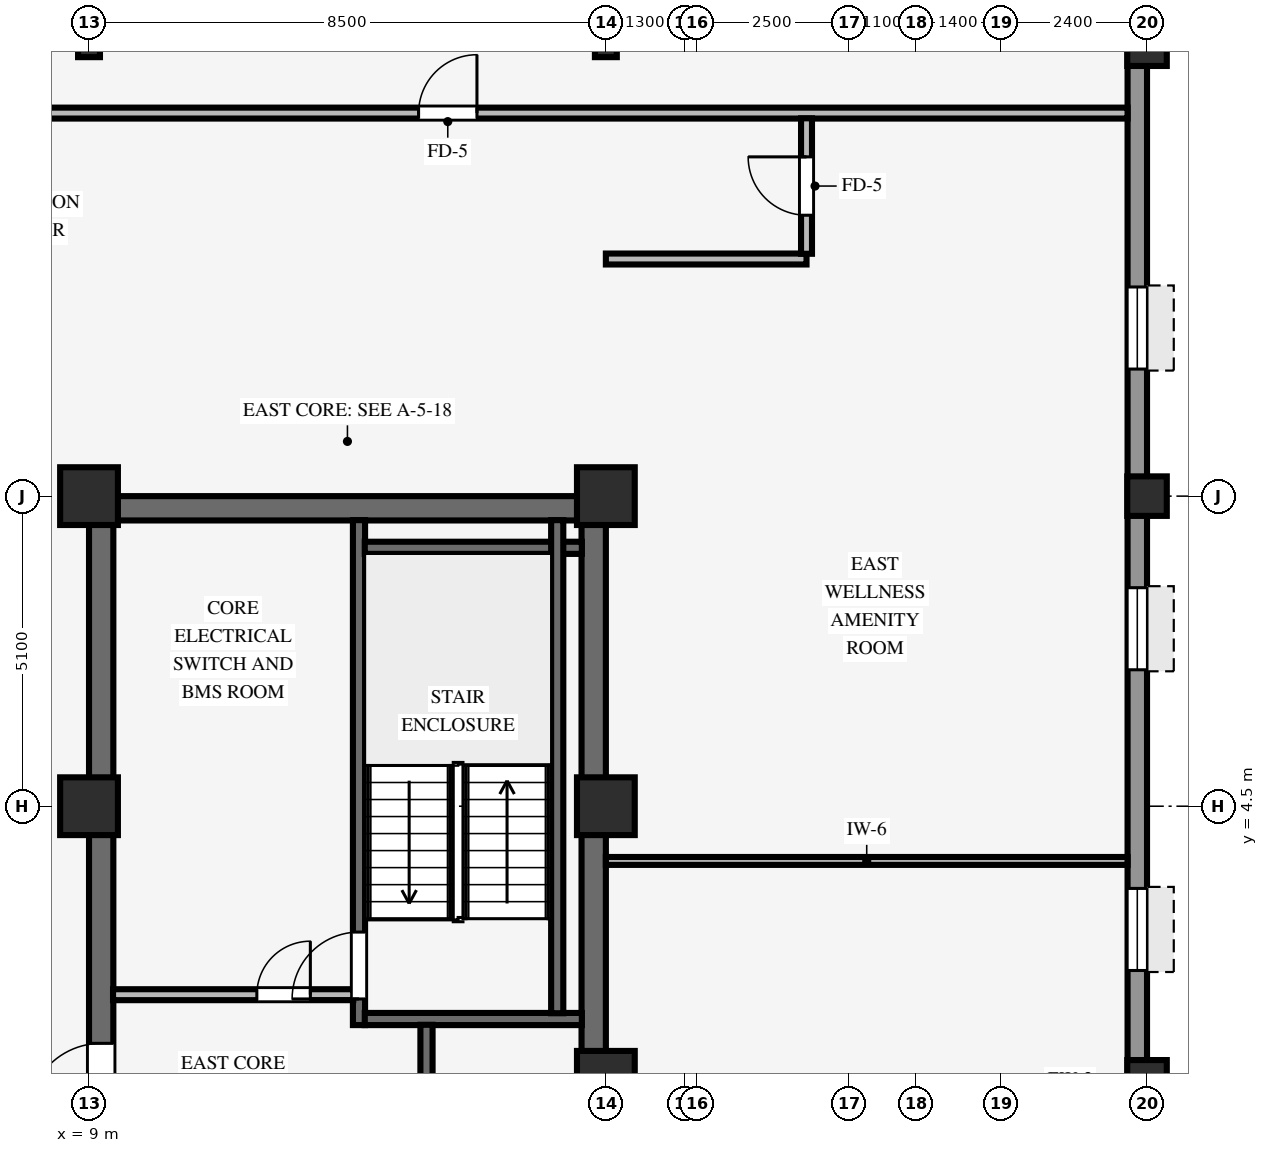
"""IFC4 building model, lengths in metres.
Left out: names, types, materials, properties, quantities, classifications, styles, units other than length and angle.
Written with IfcOpenShell. Run it as: python <this file> out.ifc"""

import sys

from ifc_helpers import new_model, si_unit, direction, frame, frame_2d, origin, origin_2d, place, context, subcontext, project, spatial, rectangle, hollow_rectangle, i_section, extrude, source, transform, mapped, element, fill, save


model = new_model("IFC4")
c1 = context("Model", 3, precision=1e-05, world=origin(), true_north=direction((0.0, 1.0)))
c2 = subcontext(c1, "Body", "Model", "MODEL_VIEW")
j1 = project(units=[si_unit("LENGTHUNIT", "METRE"), si_unit("PLANEANGLEUNIT", "RADIAN")], contexts=[c1])
p1 = place(None, origin())
s1 = spatial("IfcSite", under=j1, at=p1, CompositionType="ELEMENT")
p2 = place(p1, origin())
s2 = spatial("IfcBuilding", under=s1, at=p2, CompositionType="ELEMENT")
p3 = place(p2, frame((0.0, 0.0, 160.35)))
s3 = spatial("IfcBuildingStorey", under=s2, at=p3, CompositionType="ELEMENT", Elevation=160.35)
p4 = place(p3, frame((9.0, 9.4, 0.0), z_axis=(0.0, 0.0, 1.0), x_axis=(1.0, 0.0, 0.0)))
e1 = element("IfcWall", 1, at=p4, inside=s3, PredefinedType="SHEAR", context=c2, shape_type="SweptSolid", body=[
    extrude(rectangle(XDim=8.5, YDim=0.4, at=frame_2d((4.25, 0.0))), origin(), (0.0, 0.0, 1.0), 3.37),
])
p5 = place(p3, frame((9.2, -9.205, 0.0), z_axis=(0.0, 0.0, 1.0), x_axis=(0.0, 1.0, 0.0)))
e2 = element("IfcWall", 2, at=p5, inside=s3, PredefinedType="SHEAR", context=c2, shape_type="SweptSolid", body=[
    extrude(rectangle(XDim=18.41, YDim=0.4, at=frame_2d((9.205, 0.0))), origin(), (0.0, 0.0, 1.0), 3.37),
])
p6 = place(p5, frame((8.605, 0.0, 0.0)))
e3 = element("IfcOpeningElement", 3, at=p6, cuts=e2, PredefinedType="OPENING", context=c2, shape_type="SweptSolid", body=[
    extrude(rectangle(XDim=1.2, YDim=2.15, at=frame_2d((0.6, 1.075))), frame((0.0, 0.21, 0.0), z_axis=(0.0, -1.0, 0.0), x_axis=(1.0, 0.0, 0.0)), (0.0, 0.0, 1.0), 0.42),
])
p7 = place(p3, frame((17.3, -9.205, 0.0), z_axis=(0.0, 0.0, 1.0), x_axis=(0.0, 1.0, 0.0)))
e4 = element("IfcWall", 4, at=p7, inside=s3, PredefinedType="SHEAR", context=c2, shape_type="SweptSolid", body=[
    extrude(rectangle(XDim=18.41, YDim=0.4, at=frame_2d((9.205, 0.0))), origin(), (0.0, 0.0, 1.0), 3.37),
])
for number, where, z_axis, x_axis in (
    (5, (9.0, 4.5, 0.0), (0.0, 0.0, 1.0), (1.0, 0.0, 0.0)),
    (6, (9.0, 9.6, 0.0), (0.0, 0.0, 1.0), (1.0, 0.0, 0.0)),
    (7, (17.5, 4.5, 0.0), (0.0, 0.0, 1.0), (1.0, 0.0, 0.0)),
    (8, (17.5, 9.6, 0.0), (0.0, 0.0, 1.0), (1.0, 0.0, 0.0)),
    (9, (17.5, 0.0, 0.0), (0.0, 0.0, 1.0), (1.0, 0.0, 0.0)),
):
    element("IfcColumn", number, at=place(p3, frame(where, z_axis=z_axis, x_axis=x_axis)), inside=s3, PredefinedType="COLUMN", context=c2, shape_type="SweptSolid", body=[
        extrude(rectangle(XDim=0.95, YDim=0.95, at=origin_2d()), origin(), (0.0, 0.0, 1.0), 3.37),
    ])
for number, where, z_axis, x_axis in (
    (10, (26.4, 0.0, 0.0), (0.0, 0.0, 1.0), (1.0, 0.0, 0.0)),
    (11, (26.4, 9.6, 0.0), (0.0, 0.0, 1.0), (1.0, 0.0, 0.0)),
    (12, (26.4, 17.0, 0.0), (0.0, 0.0, 1.0), (1.0, 0.0, 0.0)),
):
    element("IfcColumn", number, at=place(p3, frame(where, z_axis=z_axis, x_axis=x_axis)), inside=s3, PredefinedType="COLUMN", context=c2, shape_type="SweptSolid", body=[
        extrude(hollow_rectangle(XDim=0.65, YDim=0.65, WallThickness=0.04, InnerFilletRadius=0.04, OuterFilletRadius=0.08, at=origin_2d()), origin(), (0.0, 0.0, 1.0), 3.37),
    ])
for number, where, z_axis, x_axis in (
    (13, (9.0, 17.0, 0.0), (0.0, 0.0, 1.0), (1.0, 0.0, 0.0)),
    (14, (17.5, 17.0, 0.0), (0.0, 0.0, 1.0), (1.0, 0.0, 0.0)),
):
    element("IfcColumn", number, at=place(p3, frame(where, z_axis=z_axis, x_axis=x_axis)), inside=s3, PredefinedType="COLUMN", context=c2, shape_type="SweptSolid", body=[
        extrude(i_section(OverallWidth=0.36, OverallDepth=0.36, WebThickness=0.021, FlangeThickness=0.021, FilletRadius=0.018, at=origin_2d()), origin(), (0.0, 0.0, 1.0), 3.37),
    ])
p8 = place(p3, frame((26.24, -20.784, 0.0), z_axis=(0.0, 0.0, 1.0), x_axis=(0.0, 1.0, 0.0)))
e15 = element("IfcWall", 15, at=p8, inside=s3, PredefinedType="STANDARD", context=c2, shape_type="SweptSolid", body=[
    extrude(rectangle(XDim=41.568, YDim=0.32, at=frame_2d((20.784, 0.0))), origin(), (0.0, 0.0, 1.0), 2.705),
])
p9 = place(p8, frame((1.448, 0.0, 0.8)))
e16 = element("IfcOpeningElement", 16, at=p9, cuts=e15, PredefinedType="OPENING", context=c2, shape_type="SweptSolid", body=[
    extrude(rectangle(XDim=1.35, YDim=1.56, at=frame_2d((0.675, 0.78))), frame((0.0, 0.17, 0.0), z_axis=(0.0, -1.0, 0.0), x_axis=(1.0, 0.0, 0.0)), (0.0, 0.0, 1.0), 0.34),
])
p10 = place(p8, frame((7.744, 0.0, 0.8)))
e17 = element("IfcOpeningElement", 17, at=p10, cuts=e15, PredefinedType="OPENING", context=c2, shape_type="SweptSolid", body=[
    extrude(rectangle(XDim=1.35, YDim=1.56, at=frame_2d((0.675, 0.78))), frame((0.0, 0.17, 0.0), z_axis=(0.0, -1.0, 0.0), x_axis=(1.0, 0.0, 0.0)), (0.0, 0.0, 1.0), 0.34),
])
p11 = place(p8, frame((12.69, 0.0, 0.8)))
e18 = element("IfcOpeningElement", 18, at=p11, cuts=e15, PredefinedType="OPENING", context=c2, shape_type="SweptSolid", body=[
    extrude(rectangle(XDim=1.35, YDim=1.56, at=frame_2d((0.675, 0.78))), frame((0.0, 0.17, 0.0), z_axis=(0.0, -1.0, 0.0), x_axis=(1.0, 0.0, 0.0)), (0.0, 0.0, 1.0), 0.34),
])
p12 = place(p8, frame((17.636, 0.0, 0.8)))
e19 = element("IfcOpeningElement", 19, at=p12, cuts=e15, PredefinedType="OPENING", context=c2, shape_type="SweptSolid", body=[
    extrude(rectangle(XDim=1.35, YDim=1.56, at=frame_2d((0.675, 0.78))), frame((0.0, 0.17, 0.0), z_axis=(0.0, -1.0, 0.0), x_axis=(1.0, 0.0, 0.0)), (0.0, 0.0, 1.0), 0.34),
])
p13 = place(p8, frame((22.582, 0.0, 0.8)))
e20 = element("IfcOpeningElement", 20, at=p13, cuts=e15, PredefinedType="OPENING", context=c2, shape_type="SweptSolid", body=[
    extrude(rectangle(XDim=1.35, YDim=1.56, at=frame_2d((0.675, 0.78))), frame((0.0, 0.17, 0.0), z_axis=(0.0, -1.0, 0.0), x_axis=(1.0, 0.0, 0.0)), (0.0, 0.0, 1.0), 0.34),
])
p14 = place(p8, frame((27.528, 0.0, 0.8)))
e21 = element("IfcOpeningElement", 21, at=p14, cuts=e15, PredefinedType="OPENING", context=c2, shape_type="SweptSolid", body=[
    extrude(rectangle(XDim=1.35, YDim=1.56, at=frame_2d((0.675, 0.78))), frame((0.0, 0.17, 0.0), z_axis=(0.0, -1.0, 0.0), x_axis=(1.0, 0.0, 0.0)), (0.0, 0.0, 1.0), 0.34),
])
p15 = place(p8, frame((32.474, 0.0, 0.8)))
e22 = element("IfcOpeningElement", 22, at=p15, cuts=e15, PredefinedType="OPENING", context=c2, shape_type="SweptSolid", body=[
    extrude(rectangle(XDim=1.35, YDim=1.56, at=frame_2d((0.675, 0.78))), frame((0.0, 0.17, 0.0), z_axis=(0.0, -1.0, 0.0), x_axis=(1.0, 0.0, 0.0)), (0.0, 0.0, 1.0), 0.34),
])
p16 = place(p8, frame((38.77, 0.0, 0.8)))
e23 = element("IfcOpeningElement", 23, at=p16, cuts=e15, PredefinedType="OPENING", context=c2, shape_type="SweptSolid", body=[
    extrude(rectangle(XDim=1.35, YDim=1.56, at=frame_2d((0.675, 0.78))), frame((0.0, 0.17, 0.0), z_axis=(0.0, -1.0, 0.0), x_axis=(1.0, 0.0, 0.0)), (0.0, 0.0, 1.0), 0.34),
])
p17 = place(p3, frame((13.44, 0.9, 0.0), z_axis=(0.0, 0.0, 1.0), x_axis=(0.0, 1.0, 0.0)))
e24 = element("IfcWall", 24, at=p17, inside=s3, PredefinedType="SHEAR", context=c2, shape_type="SweptSolid", body=[
    extrude(rectangle(XDim=8.305, YDim=0.2, at=frame_2d((4.153, 0.0))), origin(), (0.0, 0.0, 1.0), 3.37),
])
p18 = place(p17, frame((0.43, 0.0, 0.0)))
e25 = element("IfcOpeningElement", 25, at=p18, cuts=e24, PredefinedType="OPENING", context=c2, shape_type="SweptSolid", body=[
    extrude(rectangle(XDim=1.1, YDim=2.15, at=frame_2d((0.55, 1.075))), frame((0.0, 0.11, 0.0), z_axis=(0.0, -1.0, 0.0), x_axis=(1.0, 0.0, 0.0)), (0.0, 0.0, 1.0), 0.22),
])
for number, where, z_axis, x_axis in (
    (26, (13.535, 1.0, 0.0), (0.0, 0.0, 1.0), (1.0, 0.0, 0.0)),
    (27, (13.535, 8.75, 0.0), (0.0, 0.0, 1.0), (1.0, 0.0, 0.0)),
):
    element("IfcWall", number, at=place(p3, frame(where, z_axis=z_axis, x_axis=x_axis)), inside=s3, PredefinedType="SHEAR", context=c2, shape_type="SweptSolid", body=[
        extrude(rectangle(XDim=3.57, YDim=0.2, at=frame_2d((1.785, 0.0))), origin(), (0.0, 0.0, 1.0), 3.37),
    ])
p19 = place(p3, frame((16.7, 1.095, 0.0), z_axis=(0.0, 0.0, 1.0), x_axis=(0.0, 1.0, 0.0)))
e28 = element("IfcWall", 28, at=p19, inside=s3, PredefinedType="SHEAR", context=c2, shape_type="SweptSolid", body=[
    extrude(rectangle(XDim=8.11, YDim=0.2, at=frame_2d((4.055, 0.0))), origin(), (0.0, 0.0, 1.0), 3.37),
])
p20 = place(p3, frame((14.55, -9.205, 0.0), z_axis=(0.0, 0.0, 1.0), x_axis=(0.0, 1.0, 0.0)))
e29 = element("IfcWall", 29, at=p20, inside=s3, PredefinedType="SHEAR", context=c2, shape_type="SweptSolid", body=[
    extrude(rectangle(XDim=10.11, YDim=0.2, at=frame_2d((5.055, 0.0))), origin(), (0.0, 0.0, 1.0), 3.37),
])
p21 = place(p20, frame((6.565, 0.0, 0.0)))
e30 = element("IfcOpeningElement", 30, at=p21, cuts=e29, PredefinedType="OPENING", context=c2, shape_type="SweptSolid", body=[
    extrude(rectangle(XDim=0.88, YDim=2.1, at=frame_2d((0.44, 1.05))), frame((0.0, 0.11, 0.0), z_axis=(0.0, -1.0, 0.0), x_axis=(1.0, 0.0, 0.0)), (0.0, 0.0, 1.0), 0.22),
])
p22 = place(p20, frame((0.93, 0.0, 0.0)))
e31 = element("IfcOpeningElement", 31, at=p22, cuts=e29, PredefinedType="OPENING", context=c2, shape_type="SweptSolid", body=[
    extrude(rectangle(XDim=1.15, YDim=2.15, at=frame_2d((0.575, 1.075))), frame((0.0, 0.11, 0.0), z_axis=(0.0, -1.0, 0.0), x_axis=(1.0, 0.0, 0.0)), (0.0, 0.0, 1.0), 0.22),
])
p23 = place(p3, frame((9.395, 1.4, 0.0), z_axis=(0.0, 0.0, 1.0), x_axis=(1.0, 0.0, 0.0)))
e32 = element("IfcWall", 32, at=p23, inside=s3, PredefinedType="PARTITIONING", context=c2, shape_type="SweptSolid", body=[
    extrude(rectangle(XDim=3.95, YDim=0.18, at=frame_2d((1.975, 0.0))), origin(), (0.0, 0.0, 1.0), 3.36),
])
p24 = place(p23, frame((2.365, 0.0, 0.0)))
e33 = element("IfcOpeningElement", 33, at=p24, cuts=e32, PredefinedType="OPENING", context=c2, shape_type="SweptSolid", body=[
    extrude(rectangle(XDim=0.88, YDim=2.1, at=frame_2d((0.44, 1.05))), frame((0.0, 0.1, 0.0), z_axis=(0.0, -1.0, 0.0), x_axis=(1.0, 0.0, 0.0)), (0.0, 0.0, 1.0), 0.2),
])
p25 = place(p3, frame((17.5, 3.6, 0.0), z_axis=(0.0, 0.0, 1.0), x_axis=(1.0, 0.0, 0.0)))
e34 = element("IfcWall", 34, at=p25, inside=s3, PredefinedType="PARTITIONING", context=c2, shape_type="SweptSolid", body=[
    extrude(rectangle(XDim=8.58, YDim=0.13, at=frame_2d((4.29, 0.0))), origin(), (0.0, 0.0, 1.0), 3.36),
])
p26 = place(p3, frame((17.5, 13.5, 0.0), z_axis=(0.0, 0.0, 1.0), x_axis=(1.0, 0.0, 0.0)))
e35 = element("IfcWall", 35, at=p26, inside=s3, PredefinedType="PARTITIONING", context=c2, shape_type="SweptSolid", body=[
    extrude(rectangle(XDim=3.3, YDim=0.18, at=frame_2d((1.65, 0.0))), origin(), (0.0, 0.0, 1.0), 2.998),
])
p27 = place(p3, frame((-26.08, 15.9, 0.0), z_axis=(0.0, 0.0, 1.0), x_axis=(1.0, 0.0, 0.0)))
e36 = element("IfcWall", 36, at=p27, inside=s3, PredefinedType="PARTITIONING", context=c2, shape_type="SweptSolid", body=[
    extrude(rectangle(XDim=52.16, YDim=0.18, at=frame_2d((26.08, 0.0))), origin(), (0.0, 0.0, 1.0), 3.36),
])
p28 = place(p27, frame((24.5, 0.0, 0.0)))
e37 = element("IfcOpeningElement", 37, at=p28, cuts=e36, PredefinedType="OPENING", context=c2, shape_type="SweptSolid", body=[
    extrude(rectangle(XDim=0.96, YDim=2.1, at=frame_2d((0.48, 1.05))), frame((0.0, 0.1, 0.0), z_axis=(0.0, -1.0, 0.0), x_axis=(1.0, 0.0, 0.0)), (0.0, 0.0, 1.0), 0.2),
])
p29 = place(p27, frame((40.5, 0.0, 0.0)))
e38 = element("IfcOpeningElement", 38, at=p29, cuts=e36, PredefinedType="OPENING", context=c2, shape_type="SweptSolid", body=[
    extrude(rectangle(XDim=0.96, YDim=2.1, at=frame_2d((0.48, 1.05))), frame((0.0, 0.1, 0.0), z_axis=(0.0, -1.0, 0.0), x_axis=(1.0, 0.0, 0.0)), (0.0, 0.0, 1.0), 0.2),
])
p30 = place(p27, frame((13.16, 0.0, 0.0)))
e39 = element("IfcOpeningElement", 39, at=p30, cuts=e36, PredefinedType="OPENING", context=c2, shape_type="SweptSolid", body=[
    extrude(rectangle(XDim=0.96, YDim=2.1, at=frame_2d((0.48, 1.05))), frame((0.0, 0.1, 0.0), z_axis=(0.0, -1.0, 0.0), x_axis=(1.0, 0.0, 0.0)), (0.0, 0.0, 1.0), 0.2),
])
p31 = place(p27, frame((6.425, 0.0, 0.0)))
e40 = element("IfcOpeningElement", 40, at=p31, cuts=e36, PredefinedType="OPENING", context=c2, shape_type="SweptSolid", body=[
    extrude(rectangle(XDim=0.96, YDim=2.1, at=frame_2d((0.48, 1.05))), frame((0.0, 0.1, 0.0), z_axis=(0.0, -1.0, 0.0), x_axis=(1.0, 0.0, 0.0)), (0.0, 0.0, 1.0), 0.2),
])
p32 = place(p3, frame((20.8, 13.586, 0.0), z_axis=(0.0, 0.0, 1.0), x_axis=(0.0, 1.0, 0.0)))
e41 = element("IfcWall", 41, at=p32, inside=s3, PredefinedType="PARTITIONING", context=c2, shape_type="SweptSolid", body=[
    extrude(rectangle(XDim=2.228, YDim=0.18, at=frame_2d((1.114, 0.0))), origin(), (0.0, 0.0, 1.0), 3.36),
])
p33 = place(p32, frame((0.634, 0.0, 0.0)))
e42 = element("IfcOpeningElement", 42, at=p33, cuts=e41, PredefinedType="OPENING", context=c2, shape_type="SweptSolid", body=[
    extrude(rectangle(XDim=0.96, YDim=2.1, at=frame_2d((0.48, 1.05))), frame((0.0, 0.1, 0.0), z_axis=(0.0, -1.0, 0.0), x_axis=(1.0, 0.0, 0.0)), (0.0, 0.0, 1.0), 0.2),
])
m1 = source(origin(), c2, "Body", "SweptSolid", [
    extrude(rectangle(XDim=1.35, YDim=1.56, at=frame_2d((0.675, 0.78))), frame((0.0, 0.03, 0.0), z_axis=(0.0, -1.0, 0.0), x_axis=(1.0, 0.0, 0.0)), (0.0, 0.0, 1.0), 0.06),
])
p34 = place(p13, origin())
e43 = element("IfcWindow", 43, at=p34, inside=s3, PartitioningType="SINGLE_PANEL", PredefinedType="WINDOW", context=c2, shape_type="MappedRepresentation", body=[
    mapped(m1, transform((0.0, 0.0, 0.0), scale=1.0)),
])
fill(e20, e43)
p35 = place(p14, origin())
e44 = element("IfcWindow", 44, at=p35, inside=s3, PartitioningType="SINGLE_PANEL", PredefinedType="WINDOW", context=c2, shape_type="MappedRepresentation", body=[
    mapped(m1, transform((0.0, 0.0, 0.0), scale=1.0)),
])
fill(e21, e44)
p36 = place(p15, origin())
e45 = element("IfcWindow", 45, at=p36, inside=s3, PartitioningType="SINGLE_PANEL", PredefinedType="WINDOW", context=c2, shape_type="MappedRepresentation", body=[
    mapped(m1, transform((0.0, 0.0, 0.0), scale=1.0)),
])
fill(e22, e45)
m2 = source(origin(), c2, "Body", "SweptSolid", [
    extrude(rectangle(XDim=1.1, YDim=2.15, at=frame_2d((0.55, 1.075))), frame((0.0, 0.025, 0.0), z_axis=(0.0, -1.0, 0.0), x_axis=(1.0, 0.0, 0.0)), (0.0, 0.0, 1.0), 0.05),
])
p37 = place(p18, origin())
e46 = element("IfcDoor", 46, at=p37, inside=s3, OperationType="SINGLE_SWING_LEFT", PredefinedType="DOOR", context=c2, shape_type="MappedRepresentation", body=[
    mapped(m2, transform((0.0, 0.0, 0.0), scale=1.0)),
])
fill(e25, e46)
m3 = source(origin(), c2, "Body", "SweptSolid", [
    extrude(rectangle(XDim=1.2, YDim=2.15, at=frame_2d((0.6, 1.075))), frame((0.0, 0.025, 0.0), z_axis=(0.0, -1.0, 0.0), x_axis=(1.0, 0.0, 0.0)), (0.0, 0.0, 1.0), 0.05),
])
p38 = place(p6, origin())
e47 = element("IfcDoor", 47, at=p38, inside=s3, OperationType="SINGLE_SWING_LEFT", PredefinedType="DOOR", context=c2, shape_type="MappedRepresentation", body=[
    mapped(m3, transform((0.0, 0.0, 0.0), scale=1.0)),
])
fill(e3, e47)
m4 = source(origin(), c2, "Body", "SweptSolid", [
    extrude(rectangle(XDim=0.88, YDim=2.1, at=frame_2d((0.44, 1.05))), frame((0.0, 0.025, 0.0), z_axis=(0.0, -1.0, 0.0), x_axis=(1.0, 0.0, 0.0)), (0.0, 0.0, 1.0), 0.05),
])
p39 = place(p24, origin())
e48 = element("IfcDoor", 48, at=p39, inside=s3, OperationType="SINGLE_SWING_RIGHT", PredefinedType="DOOR", context=c2, shape_type="MappedRepresentation", body=[
    mapped(m4, transform((0.0, 0.0, 0.0), scale=1.0)),
])
fill(e33, e48)
m5 = source(origin(), c2, "Body", "SweptSolid", [
    extrude(rectangle(XDim=0.96, YDim=2.1, at=frame_2d((0.48, 1.05))), frame((0.0, 0.025, 0.0), z_axis=(0.0, -1.0, 0.0), x_axis=(1.0, 0.0, 0.0)), (0.0, 0.0, 1.0), 0.05),
])
p40 = place(p29, origin())
e49 = element("IfcDoor", 49, at=p40, inside=s3, OperationType="SINGLE_SWING_RIGHT", PredefinedType="DOOR", context=c2, shape_type="MappedRepresentation", body=[
    mapped(m5, transform((0.0, 0.0, 0.0), scale=1.0)),
])
fill(e38, e49)
p41 = place(p33, origin())
e50 = element("IfcDoor", 50, at=p41, inside=s3, OperationType="SINGLE_SWING_RIGHT", PredefinedType="DOOR", context=c2, shape_type="MappedRepresentation", body=[
    mapped(m5, transform((0.0, 0.0, 0.0), scale=1.0)),
])
fill(e42, e50)
save(model, sys.argv[1])
